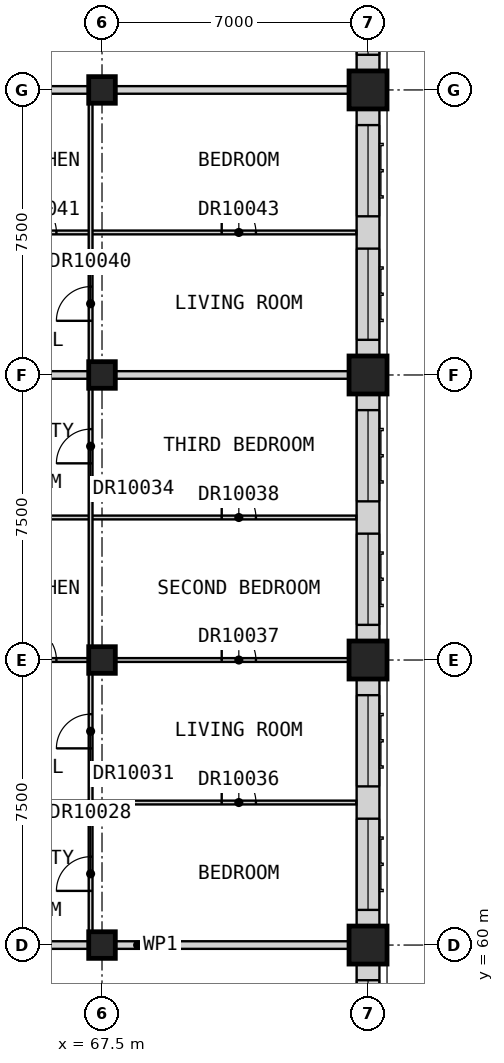
"""IFC4 building model, lengths in metres.
Left out: names, types, materials, properties, quantities, classifications, styles, units other than length and angle.
Written with IfcOpenShell. Run it as: python <this file> out.ifc"""

import sys

from ifc_helpers import new_model, si_unit, direction, frame, frame_2d, origin, origin_2d, place, context, subcontext, project, spatial, rectangle, extrude, element, fill, save


model = new_model("IFC4")
c1 = context("Model", 3, precision=1e-05, world=origin(), true_north=direction((0.0, 1.0)))
c2 = subcontext(c1, "Body", "Model", "MODEL_VIEW")
j1 = project(units=[si_unit("LENGTHUNIT", "METRE"), si_unit("PLANEANGLEUNIT", "RADIAN")], contexts=[c1])
p1 = place(None, origin())
s1 = spatial("IfcSite", under=j1, at=p1, CompositionType="ELEMENT")
p2 = place(p1, origin())
s2 = spatial("IfcBuilding", under=s1, at=p2, CompositionType="ELEMENT")
p3 = place(p2, frame((0.0, 0.0, 283.7)))
s3 = spatial("IfcBuildingStorey", under=s2, at=p3, CompositionType="ELEMENT", Elevation=283.7)
for number, where, z_axis, x_axis in (
    (1, (67.5, 60.0, 0.0), (0.0, 0.0, 1.0), (1.0, 0.0, 0.0)),
    (2, (67.5, 67.5, 0.0), (0.0, 0.0, 1.0), (1.0, 0.0, 0.0)),
    (3, (67.5, 75.0, 0.0), (0.0, 0.0, 1.0), (1.0, 0.0, 0.0)),
    (4, (67.5, 82.5, 0.0), (0.0, 0.0, 1.0), (1.0, 0.0, 0.0)),
):
    element("IfcColumn", number, at=place(p3, frame(where, z_axis=z_axis, x_axis=x_axis)), inside=s3, PredefinedType="COLUMN", context=c2, shape_type="SweptSolid", body=[
        extrude(rectangle(XDim=0.7, YDim=0.7, at=origin_2d()), origin(), (0.0, 0.0, 1.0), 3.5),
    ])
for number, where, z_axis, x_axis in (
    (5, (74.5, 60.0, 0.0), (0.0, 0.0, 1.0), (1.0, 0.0, 0.0)),
    (6, (74.5, 67.5, 0.0), (0.0, 0.0, 1.0), (1.0, 0.0, 0.0)),
    (7, (74.5, 75.0, 0.0), (0.0, 0.0, 1.0), (1.0, 0.0, 0.0)),
    (8, (74.5, 82.5, 0.0), (0.0, 0.0, 1.0), (1.0, 0.0, 0.0)),
):
    element("IfcColumn", number, at=place(p3, frame(where, z_axis=z_axis, x_axis=x_axis)), inside=s3, PredefinedType="COLUMN", context=c2, shape_type="SweptSolid", body=[
        extrude(rectangle(XDim=1.0, YDim=1.0, at=origin_2d()), origin(), (0.0, 0.0, 1.0), 3.5),
    ])
p4 = place(p3, frame((74.5, 53.0, 0.0), z_axis=(0.0, 0.0, 1.0), x_axis=(0.0, 1.0, 0.0)))
e9 = element("IfcWall", 9, at=p4, inside=s3, PredefinedType="SOLIDWALL", context=c2, shape_type="SweptSolid", body=[
    extrude(rectangle(XDim=6.5, YDim=0.6, at=frame_2d((3.25, 0.0))), origin(), (0.0, 0.0, 1.0), 2.75),
])
p5 = place(p4, frame((0.425, 0.0, 0.8)))
e10 = element("IfcOpeningElement", 10, at=p5, cuts=e9, PredefinedType="OPENING", context=c2, shape_type="SweptSolid", body=[
    extrude(rectangle(XDim=2.4, YDim=1.8, at=frame_2d((1.2, 0.9))), frame((0.0, 0.31, 0.0), z_axis=(0.0, -1.0, 0.0), x_axis=(1.0, 0.0, 0.0)), (0.0, 0.0, 1.0), 0.62),
])
p6 = place(p4, frame((3.675, 0.0, 0.8)))
e11 = element("IfcOpeningElement", 11, at=p6, cuts=e9, PredefinedType="OPENING", context=c2, shape_type="SweptSolid", body=[
    extrude(rectangle(XDim=2.4, YDim=1.8, at=frame_2d((1.2, 0.9))), frame((0.0, 0.31, 0.0), z_axis=(0.0, -1.0, 0.0), x_axis=(1.0, 0.0, 0.0)), (0.0, 0.0, 1.0), 0.62),
])
p7 = place(p3, frame((74.5, 60.5, 0.0), z_axis=(0.0, 0.0, 1.0), x_axis=(0.0, 1.0, 0.0)))
e12 = element("IfcWall", 12, at=p7, inside=s3, PredefinedType="SOLIDWALL", context=c2, shape_type="SweptSolid", body=[
    extrude(rectangle(XDim=6.5, YDim=0.6, at=frame_2d((3.25, 0.0))), origin(), (0.0, 0.0, 1.0), 2.75),
])
p8 = place(p7, frame((0.425, 0.0, 0.8)))
e13 = element("IfcOpeningElement", 13, at=p8, cuts=e12, PredefinedType="OPENING", context=c2, shape_type="SweptSolid", body=[
    extrude(rectangle(XDim=2.4, YDim=1.8, at=frame_2d((1.2, 0.9))), frame((0.0, 0.31, 0.0), z_axis=(0.0, -1.0, 0.0), x_axis=(1.0, 0.0, 0.0)), (0.0, 0.0, 1.0), 0.62),
])
p9 = place(p7, frame((3.675, 0.0, 0.8)))
e14 = element("IfcOpeningElement", 14, at=p9, cuts=e12, PredefinedType="OPENING", context=c2, shape_type="SweptSolid", body=[
    extrude(rectangle(XDim=2.4, YDim=1.8, at=frame_2d((1.2, 0.9))), frame((0.0, 0.31, 0.0), z_axis=(0.0, -1.0, 0.0), x_axis=(1.0, 0.0, 0.0)), (0.0, 0.0, 1.0), 0.62),
])
p10 = place(p3, frame((74.5, 68.0, 0.0), z_axis=(0.0, 0.0, 1.0), x_axis=(0.0, 1.0, 0.0)))
e15 = element("IfcWall", 15, at=p10, inside=s3, PredefinedType="SOLIDWALL", context=c2, shape_type="SweptSolid", body=[
    extrude(rectangle(XDim=6.5, YDim=0.6, at=frame_2d((3.25, 0.0))), origin(), (0.0, 0.0, 1.0), 2.75),
])
p11 = place(p10, frame((0.425, 0.0, 0.8)))
e16 = element("IfcOpeningElement", 16, at=p11, cuts=e15, PredefinedType="OPENING", context=c2, shape_type="SweptSolid", body=[
    extrude(rectangle(XDim=2.4, YDim=1.8, at=frame_2d((1.2, 0.9))), frame((0.0, 0.31, 0.0), z_axis=(0.0, -1.0, 0.0), x_axis=(1.0, 0.0, 0.0)), (0.0, 0.0, 1.0), 0.62),
])
p12 = place(p10, frame((3.675, 0.0, 0.8)))
e17 = element("IfcOpeningElement", 17, at=p12, cuts=e15, PredefinedType="OPENING", context=c2, shape_type="SweptSolid", body=[
    extrude(rectangle(XDim=2.4, YDim=1.8, at=frame_2d((1.2, 0.9))), frame((0.0, 0.31, 0.0), z_axis=(0.0, -1.0, 0.0), x_axis=(1.0, 0.0, 0.0)), (0.0, 0.0, 1.0), 0.62),
])
p13 = place(p3, frame((74.5, 75.5, 0.0), z_axis=(0.0, 0.0, 1.0), x_axis=(0.0, 1.0, 0.0)))
e18 = element("IfcWall", 18, at=p13, inside=s3, PredefinedType="SOLIDWALL", context=c2, shape_type="SweptSolid", body=[
    extrude(rectangle(XDim=6.5, YDim=0.6, at=frame_2d((3.25, 0.0))), origin(), (0.0, 0.0, 1.0), 2.75),
])
p14 = place(p13, frame((0.425, 0.0, 0.8)))
e19 = element("IfcOpeningElement", 19, at=p14, cuts=e18, PredefinedType="OPENING", context=c2, shape_type="SweptSolid", body=[
    extrude(rectangle(XDim=2.4, YDim=1.8, at=frame_2d((1.2, 0.9))), frame((0.0, 0.31, 0.0), z_axis=(0.0, -1.0, 0.0), x_axis=(1.0, 0.0, 0.0)), (0.0, 0.0, 1.0), 0.62),
])
p15 = place(p13, frame((3.675, 0.0, 0.8)))
e20 = element("IfcOpeningElement", 20, at=p15, cuts=e18, PredefinedType="OPENING", context=c2, shape_type="SweptSolid", body=[
    extrude(rectangle(XDim=2.4, YDim=1.8, at=frame_2d((1.2, 0.9))), frame((0.0, 0.31, 0.0), z_axis=(0.0, -1.0, 0.0), x_axis=(1.0, 0.0, 0.0)), (0.0, 0.0, 1.0), 0.62),
])
p16 = place(p3, frame((74.5, 83.0, 0.0), z_axis=(0.0, 0.0, 1.0), x_axis=(0.0, 1.0, 0.0)))
e21 = element("IfcWall", 21, at=p16, inside=s3, PredefinedType="SOLIDWALL", context=c2, shape_type="SweptSolid", body=[
    extrude(rectangle(XDim=6.5, YDim=0.6, at=frame_2d((3.25, 0.0))), origin(), (0.0, 0.0, 1.0), 2.75),
])
p17 = place(p16, frame((0.425, 0.0, 0.8)))
e22 = element("IfcOpeningElement", 22, at=p17, cuts=e21, PredefinedType="OPENING", context=c2, shape_type="SweptSolid", body=[
    extrude(rectangle(XDim=2.4, YDim=1.8, at=frame_2d((1.2, 0.9))), frame((0.0, 0.31, 0.0), z_axis=(0.0, -1.0, 0.0), x_axis=(1.0, 0.0, 0.0)), (0.0, 0.0, 1.0), 0.62),
])
p18 = place(p16, frame((3.675, 0.0, 0.8)))
e23 = element("IfcOpeningElement", 23, at=p18, cuts=e21, PredefinedType="OPENING", context=c2, shape_type="SweptSolid", body=[
    extrude(rectangle(XDim=2.4, YDim=1.8, at=frame_2d((1.2, 0.9))), frame((0.0, 0.31, 0.0), z_axis=(0.0, -1.0, 0.0), x_axis=(1.0, 0.0, 0.0)), (0.0, 0.0, 1.0), 0.62),
])
for number, where, z_axis, x_axis in (
    (24, (61.875, 60.0, 0.0), (0.0, 0.0, 1.0), (1.0, 0.0, 0.0)),
    (25, (61.875, 75.0, 0.0), (0.0, 0.0, 1.0), (1.0, 0.0, 0.0)),
    (26, (61.875, 82.5, 0.0), (0.0, 0.0, 1.0), (1.0, 0.0, 0.0)),
):
    element("IfcWall", number, at=place(p3, frame(where, z_axis=z_axis, x_axis=x_axis)), inside=s3, PredefinedType="PARTITIONING", context=c2, shape_type="SweptSolid", body=[
        extrude(rectangle(XDim=13.125, YDim=0.2, at=frame_2d((6.562, 0.0))), origin(), (0.0, 0.0, 1.0), 3.2),
    ])
p19 = place(p3, frame((64.562, 63.75, 0.0), z_axis=(0.0, 0.0, 1.0), x_axis=(1.0, 0.0, 0.0)))
e27 = element("IfcWall", 27, at=p19, inside=s3, PredefinedType="PARTITIONING", context=c2, shape_type="SweptSolid", body=[
    extrude(rectangle(XDim=9.627, YDim=0.1, at=frame_2d((4.814, 0.0))), origin(), (0.0, 0.0, 1.0), 3.2),
])
p20 = place(p19, frame((6.087, 0.0, 0.0)))
e28 = element("IfcOpeningElement", 28, at=p20, cuts=e27, PredefinedType="OPENING", context=c2, shape_type="SweptSolid", body=[
    extrude(rectangle(XDim=0.9, YDim=2.1, at=frame_2d((0.45, 1.05))), frame((0.0, 0.06, 0.0), z_axis=(0.0, -1.0, 0.0), x_axis=(1.0, 0.0, 0.0)), (0.0, 0.0, 1.0), 0.12),
])
p21 = place(p3, frame((64.562, 67.5, 0.0), z_axis=(0.0, 0.0, 1.0), x_axis=(1.0, 0.0, 0.0)))
e29 = element("IfcWall", 29, at=p21, inside=s3, PredefinedType="PARTITIONING", context=c2, shape_type="SweptSolid", body=[
    extrude(rectangle(XDim=10.438, YDim=0.1, at=frame_2d((5.219, 0.0))), origin(), (0.0, 0.0, 1.0), 3.2),
])
p22 = place(p21, frame((0.837, 0.0, 0.0)))
e30 = element("IfcOpeningElement", 30, at=p22, cuts=e29, PredefinedType="OPENING", context=c2, shape_type="SweptSolid", body=[
    extrude(rectangle(XDim=0.9, YDim=2.1, at=frame_2d((0.45, 1.05))), frame((0.0, 0.06, 0.0), z_axis=(0.0, -1.0, 0.0), x_axis=(1.0, 0.0, 0.0)), (0.0, 0.0, 1.0), 0.12),
])
p23 = place(p21, frame((6.087, 0.0, 0.0)))
e31 = element("IfcOpeningElement", 31, at=p23, cuts=e29, PredefinedType="OPENING", context=c2, shape_type="SweptSolid", body=[
    extrude(rectangle(XDim=0.9, YDim=2.1, at=frame_2d((0.45, 1.05))), frame((0.0, 0.06, 0.0), z_axis=(0.0, -1.0, 0.0), x_axis=(1.0, 0.0, 0.0)), (0.0, 0.0, 1.0), 0.12),
])
p24 = place(p3, frame((64.562, 71.25, 0.0), z_axis=(0.0, 0.0, 1.0), x_axis=(1.0, 0.0, 0.0)))
e32 = element("IfcWall", 32, at=p24, inside=s3, PredefinedType="PARTITIONING", context=c2, shape_type="SweptSolid", body=[
    extrude(rectangle(XDim=9.627, YDim=0.1, at=frame_2d((4.814, 0.0))), origin(), (0.0, 0.0, 1.0), 3.2),
])
p25 = place(p24, frame((6.087, 0.0, 0.0)))
e33 = element("IfcOpeningElement", 33, at=p25, cuts=e32, PredefinedType="OPENING", context=c2, shape_type="SweptSolid", body=[
    extrude(rectangle(XDim=0.9, YDim=2.1, at=frame_2d((0.45, 1.05))), frame((0.0, 0.06, 0.0), z_axis=(0.0, -1.0, 0.0), x_axis=(1.0, 0.0, 0.0)), (0.0, 0.0, 1.0), 0.12),
])
p26 = place(p3, frame((64.562, 78.75, 0.0), z_axis=(0.0, 0.0, 1.0), x_axis=(1.0, 0.0, 0.0)))
e34 = element("IfcWall", 34, at=p26, inside=s3, PredefinedType="PARTITIONING", context=c2, shape_type="SweptSolid", body=[
    extrude(rectangle(XDim=9.627, YDim=0.1, at=frame_2d((4.814, 0.0))), origin(), (0.0, 0.0, 1.0), 3.2),
])
p27 = place(p26, frame((0.837, 0.0, 0.0)))
e35 = element("IfcOpeningElement", 35, at=p27, cuts=e34, PredefinedType="OPENING", context=c2, shape_type="SweptSolid", body=[
    extrude(rectangle(XDim=0.9, YDim=2.1, at=frame_2d((0.45, 1.05))), frame((0.0, 0.06, 0.0), z_axis=(0.0, -1.0, 0.0), x_axis=(1.0, 0.0, 0.0)), (0.0, 0.0, 1.0), 0.12),
])
p28 = place(p26, frame((6.087, 0.0, 0.0)))
e36 = element("IfcOpeningElement", 36, at=p28, cuts=e34, PredefinedType="OPENING", context=c2, shape_type="SweptSolid", body=[
    extrude(rectangle(XDim=0.9, YDim=2.1, at=frame_2d((0.45, 1.05))), frame((0.0, 0.06, 0.0), z_axis=(0.0, -1.0, 0.0), x_axis=(1.0, 0.0, 0.0)), (0.0, 0.0, 1.0), 0.12),
])
p29 = place(p3, frame((67.2, 60.1, 0.0), z_axis=(0.0, 0.0, 1.0), x_axis=(0.0, 1.0, 0.0)))
e37 = element("IfcWall", 37, at=p29, inside=s3, PredefinedType="PARTITIONING", context=c2, shape_type="SweptSolid", body=[
    extrude(rectangle(XDim=22.3, YDim=0.1, at=frame_2d((11.15, 0.0))), origin(), (0.0, 0.0, 1.0), 3.2),
])
p30 = place(p29, frame((1.325, 0.0, 0.0)))
e38 = element("IfcOpeningElement", 38, at=p30, cuts=e37, PredefinedType="OPENING", context=c2, shape_type="SweptSolid", body=[
    extrude(rectangle(XDim=0.9, YDim=2.1, at=frame_2d((0.45, 1.05))), frame((0.0, 0.06, 0.0), z_axis=(0.0, -1.0, 0.0), x_axis=(1.0, 0.0, 0.0)), (0.0, 0.0, 1.0), 0.12),
])
p31 = place(p29, frame((5.075, 0.0, 0.0)))
e39 = element("IfcOpeningElement", 39, at=p31, cuts=e37, PredefinedType="OPENING", context=c2, shape_type="SweptSolid", body=[
    extrude(rectangle(XDim=0.9, YDim=2.1, at=frame_2d((0.45, 1.05))), frame((0.0, 0.06, 0.0), z_axis=(0.0, -1.0, 0.0), x_axis=(1.0, 0.0, 0.0)), (0.0, 0.0, 1.0), 0.12),
])
p32 = place(p29, frame((12.575, 0.0, 0.0)))
e40 = element("IfcOpeningElement", 40, at=p32, cuts=e37, PredefinedType="OPENING", context=c2, shape_type="SweptSolid", body=[
    extrude(rectangle(XDim=0.9, YDim=2.1, at=frame_2d((0.45, 1.05))), frame((0.0, 0.06, 0.0), z_axis=(0.0, -1.0, 0.0), x_axis=(1.0, 0.0, 0.0)), (0.0, 0.0, 1.0), 0.12),
])
p33 = place(p29, frame((16.325, 0.0, 0.0)))
e41 = element("IfcOpeningElement", 41, at=p33, cuts=e37, PredefinedType="OPENING", context=c2, shape_type="SweptSolid", body=[
    extrude(rectangle(XDim=0.9, YDim=2.1, at=frame_2d((0.45, 1.05))), frame((0.0, 0.06, 0.0), z_axis=(0.0, -1.0, 0.0), x_axis=(1.0, 0.0, 0.0)), (0.0, 0.0, 1.0), 0.12),
])
p34 = place(p6, origin())
e42 = element("IfcWindow", 42, at=p34, inside=s3, PartitioningType="SINGLE_PANEL", PredefinedType="WINDOW", context=c2, shape_type="SweptSolid", body=[
    extrude(rectangle(XDim=2.4, YDim=1.8, at=frame_2d((1.2, 0.9))), frame((0.0, -0.07, 0.0), z_axis=(0.0, -1.0, 0.0), x_axis=(1.0, 0.0, 0.0)), (0.0, 0.0, 1.0), 0.06),
])
fill(e11, e42)
p35 = place(p8, origin())
e43 = element("IfcWindow", 43, at=p35, inside=s3, PartitioningType="SINGLE_PANEL", PredefinedType="WINDOW", context=c2, shape_type="SweptSolid", body=[
    extrude(rectangle(XDim=2.4, YDim=1.8, at=frame_2d((1.2, 0.9))), frame((0.0, -0.07, 0.0), z_axis=(0.0, -1.0, 0.0), x_axis=(1.0, 0.0, 0.0)), (0.0, 0.0, 1.0), 0.06),
])
fill(e13, e43)
p36 = place(p9, origin())
e44 = element("IfcWindow", 44, at=p36, inside=s3, PartitioningType="SINGLE_PANEL", PredefinedType="WINDOW", context=c2, shape_type="SweptSolid", body=[
    extrude(rectangle(XDim=2.4, YDim=1.8, at=frame_2d((1.2, 0.9))), frame((0.0, -0.07, 0.0), z_axis=(0.0, -1.0, 0.0), x_axis=(1.0, 0.0, 0.0)), (0.0, 0.0, 1.0), 0.06),
])
fill(e14, e44)
p37 = place(p11, origin())
e45 = element("IfcWindow", 45, at=p37, inside=s3, PartitioningType="SINGLE_PANEL", PredefinedType="WINDOW", context=c2, shape_type="SweptSolid", body=[
    extrude(rectangle(XDim=2.4, YDim=1.8, at=frame_2d((1.2, 0.9))), frame((0.0, -0.07, 0.0), z_axis=(0.0, -1.0, 0.0), x_axis=(1.0, 0.0, 0.0)), (0.0, 0.0, 1.0), 0.06),
])
fill(e16, e45)
p38 = place(p12, origin())
e46 = element("IfcWindow", 46, at=p38, inside=s3, PartitioningType="SINGLE_PANEL", PredefinedType="WINDOW", context=c2, shape_type="SweptSolid", body=[
    extrude(rectangle(XDim=2.4, YDim=1.8, at=frame_2d((1.2, 0.9))), frame((0.0, -0.07, 0.0), z_axis=(0.0, -1.0, 0.0), x_axis=(1.0, 0.0, 0.0)), (0.0, 0.0, 1.0), 0.06),
])
fill(e17, e46)
p39 = place(p14, origin())
e47 = element("IfcWindow", 47, at=p39, inside=s3, PartitioningType="SINGLE_PANEL", PredefinedType="WINDOW", context=c2, shape_type="SweptSolid", body=[
    extrude(rectangle(XDim=2.4, YDim=1.8, at=frame_2d((1.2, 0.9))), frame((0.0, -0.07, 0.0), z_axis=(0.0, -1.0, 0.0), x_axis=(1.0, 0.0, 0.0)), (0.0, 0.0, 1.0), 0.06),
])
fill(e19, e47)
p40 = place(p15, origin())
e48 = element("IfcWindow", 48, at=p40, inside=s3, PartitioningType="SINGLE_PANEL", PredefinedType="WINDOW", context=c2, shape_type="SweptSolid", body=[
    extrude(rectangle(XDim=2.4, YDim=1.8, at=frame_2d((1.2, 0.9))), frame((0.0, -0.07, 0.0), z_axis=(0.0, -1.0, 0.0), x_axis=(1.0, 0.0, 0.0)), (0.0, 0.0, 1.0), 0.06),
])
fill(e20, e48)
p41 = place(p17, origin())
e49 = element("IfcWindow", 49, at=p41, inside=s3, PartitioningType="SINGLE_PANEL", PredefinedType="WINDOW", context=c2, shape_type="SweptSolid", body=[
    extrude(rectangle(XDim=2.4, YDim=1.8, at=frame_2d((1.2, 0.9))), frame((0.0, -0.07, 0.0), z_axis=(0.0, -1.0, 0.0), x_axis=(1.0, 0.0, 0.0)), (0.0, 0.0, 1.0), 0.06),
])
fill(e22, e49)
p42 = place(p30, origin())
e50 = element("IfcDoor", 50, at=p42, inside=s3, OperationType="SINGLE_SWING_LEFT", PredefinedType="DOOR", context=c2, shape_type="SweptSolid", body=[
    extrude(rectangle(XDim=0.9, YDim=2.1, at=frame_2d((0.45, 1.05))), frame((0.0, 0.025, 0.0), z_axis=(0.0, -1.0, 0.0), x_axis=(1.0, 0.0, 0.0)), (0.0, 0.0, 1.0), 0.05),
])
fill(e38, e50)
p43 = place(p31, origin())
e51 = element("IfcDoor", 51, at=p43, inside=s3, OperationType="SINGLE_SWING_LEFT", PredefinedType="DOOR", context=c2, shape_type="SweptSolid", body=[
    extrude(rectangle(XDim=0.9, YDim=2.1, at=frame_2d((0.45, 1.05))), frame((0.0, 0.025, 0.0), z_axis=(0.0, -1.0, 0.0), x_axis=(1.0, 0.0, 0.0)), (0.0, 0.0, 1.0), 0.05),
])
fill(e39, e51)
p44 = place(p22, origin())
e52 = element("IfcDoor", 52, at=p44, inside=s3, OperationType="SINGLE_SWING_LEFT", PredefinedType="DOOR", context=c2, shape_type="SweptSolid", body=[
    extrude(rectangle(XDim=0.9, YDim=2.1, at=frame_2d((0.45, 1.05))), frame((0.0, 0.025, 0.0), z_axis=(0.0, -1.0, 0.0), x_axis=(1.0, 0.0, 0.0)), (0.0, 0.0, 1.0), 0.05),
])
fill(e30, e52)
p45 = place(p32, origin())
e53 = element("IfcDoor", 53, at=p45, inside=s3, OperationType="SINGLE_SWING_LEFT", PredefinedType="DOOR", context=c2, shape_type="SweptSolid", body=[
    extrude(rectangle(XDim=0.9, YDim=2.1, at=frame_2d((0.45, 1.05))), frame((0.0, 0.025, 0.0), z_axis=(0.0, -1.0, 0.0), x_axis=(1.0, 0.0, 0.0)), (0.0, 0.0, 1.0), 0.05),
])
fill(e40, e53)
p46 = place(p20, origin())
e54 = element("IfcDoor", 54, at=p46, inside=s3, OperationType="SINGLE_SWING_RIGHT", PredefinedType="DOOR", context=c2, shape_type="SweptSolid", body=[
    extrude(rectangle(XDim=0.9, YDim=2.1, at=frame_2d((0.45, 1.05))), frame((0.0, 0.025, 0.0), z_axis=(0.0, -1.0, 0.0), x_axis=(1.0, 0.0, 0.0)), (0.0, 0.0, 1.0), 0.05),
])
fill(e28, e54)
p47 = place(p23, origin())
e55 = element("IfcDoor", 55, at=p47, inside=s3, OperationType="SINGLE_SWING_RIGHT", PredefinedType="DOOR", context=c2, shape_type="SweptSolid", body=[
    extrude(rectangle(XDim=0.9, YDim=2.1, at=frame_2d((0.45, 1.05))), frame((0.0, 0.025, 0.0), z_axis=(0.0, -1.0, 0.0), x_axis=(1.0, 0.0, 0.0)), (0.0, 0.0, 1.0), 0.05),
])
fill(e31, e55)
p48 = place(p25, origin())
e56 = element("IfcDoor", 56, at=p48, inside=s3, OperationType="SINGLE_SWING_RIGHT", PredefinedType="DOOR", context=c2, shape_type="SweptSolid", body=[
    extrude(rectangle(XDim=0.9, YDim=2.1, at=frame_2d((0.45, 1.05))), frame((0.0, 0.025, 0.0), z_axis=(0.0, -1.0, 0.0), x_axis=(1.0, 0.0, 0.0)), (0.0, 0.0, 1.0), 0.05),
])
fill(e33, e56)
p49 = place(p33, origin())
e57 = element("IfcDoor", 57, at=p49, inside=s3, OperationType="SINGLE_SWING_LEFT", PredefinedType="DOOR", context=c2, shape_type="SweptSolid", body=[
    extrude(rectangle(XDim=0.9, YDim=2.1, at=frame_2d((0.45, 1.05))), frame((0.0, 0.025, 0.0), z_axis=(0.0, -1.0, 0.0), x_axis=(1.0, 0.0, 0.0)), (0.0, 0.0, 1.0), 0.05),
])
fill(e41, e57)
p50 = place(p27, origin())
e58 = element("IfcDoor", 58, at=p50, inside=s3, OperationType="SINGLE_SWING_LEFT", PredefinedType="DOOR", context=c2, shape_type="SweptSolid", body=[
    extrude(rectangle(XDim=0.9, YDim=2.1, at=frame_2d((0.45, 1.05))), frame((0.0, 0.025, 0.0), z_axis=(0.0, -1.0, 0.0), x_axis=(1.0, 0.0, 0.0)), (0.0, 0.0, 1.0), 0.05),
])
fill(e35, e58)
p51 = place(p28, origin())
e59 = element("IfcDoor", 59, at=p51, inside=s3, OperationType="SINGLE_SWING_RIGHT", PredefinedType="DOOR", context=c2, shape_type="SweptSolid", body=[
    extrude(rectangle(XDim=0.9, YDim=2.1, at=frame_2d((0.45, 1.05))), frame((0.0, 0.025, 0.0), z_axis=(0.0, -1.0, 0.0), x_axis=(1.0, 0.0, 0.0)), (0.0, 0.0, 1.0), 0.05),
])
fill(e36, e59)
save(model, sys.argv[1])
